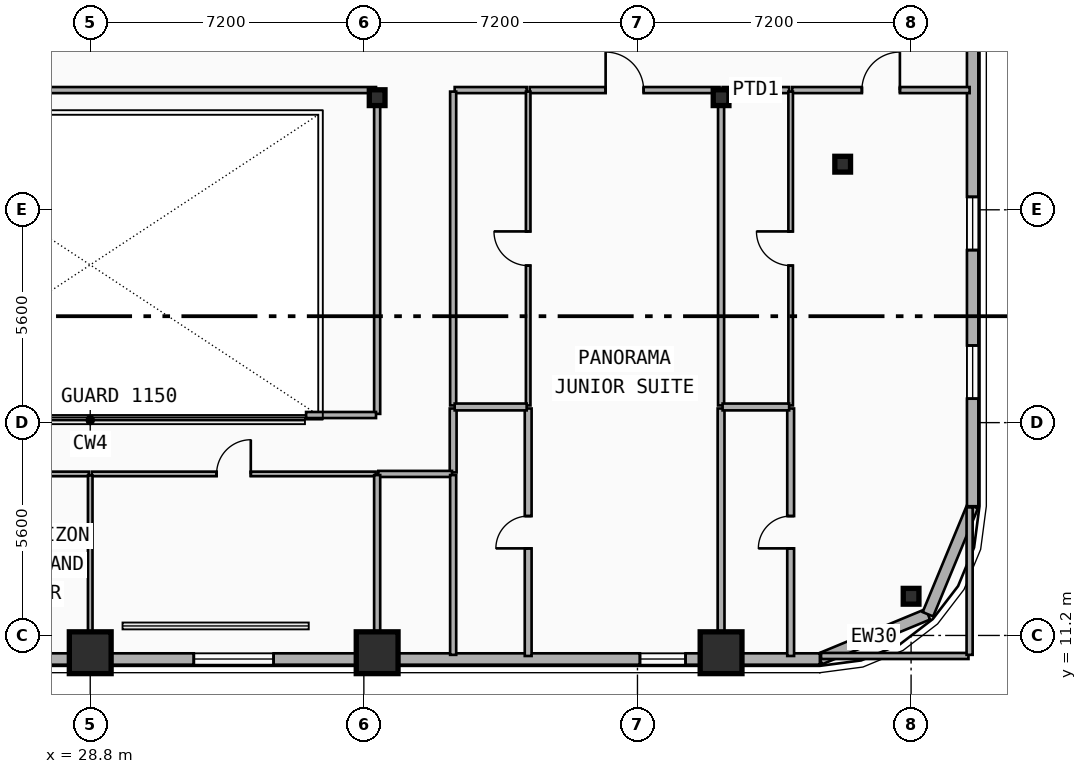
"""IFC4 building model, lengths in metres.
Left out: names, types, materials, properties, quantities, classifications, styles, units other than length and angle.
Written with IfcOpenShell. Run it as: python <this file> out.ifc"""

import sys

from ifc_helpers import new_model, si_unit, direction, frame, frame_2d, origin, origin_2d, place, context, subcontext, project, spatial, rectangle, i_section, extrude, element, fill, save


model = new_model("IFC4")
c1 = context("Model", 3, precision=1e-05, world=origin(), true_north=direction((0.0, 1.0)))
c2 = subcontext(c1, "Body", "Model", "MODEL_VIEW")
j1 = project(units=[si_unit("LENGTHUNIT", "METRE"), si_unit("PLANEANGLEUNIT", "RADIAN")], contexts=[c1])
p1 = place(None, origin())
s1 = spatial("IfcSite", under=j1, at=p1, CompositionType="ELEMENT")
p2 = place(p1, origin())
s2 = spatial("IfcBuilding", under=s1, at=p2, CompositionType="ELEMENT")
p3 = place(p2, frame((0.0, 0.0, 169.65)))
s3 = spatial("IfcBuildingStorey", under=s2, at=p3, CompositionType="ELEMENT", Elevation=169.65)
for number, where, z_axis, x_axis in (
    (1, (36.35, 25.35, 0.0), (0.0, 0.0, 1.0), (1.0, 0.0, 0.0)),
    (2, (45.4, 25.35, 0.0), (0.0, 0.0, 1.0), (1.0, 0.0, 0.0)),
):
    element("IfcColumn", number, at=place(p3, frame(where, z_axis=z_axis, x_axis=x_axis)), inside=s3, PredefinedType="COLUMN", context=c2, shape_type="SweptSolid", body=[
        extrude(i_section(OverallWidth=0.413, OverallDepth=0.415, WebThickness=0.03, FlangeThickness=0.047, FilletRadius=0.015, at=origin_2d()), origin(), (0.0, 0.0, 1.0), 3.55),
    ])
for number, where, z_axis, x_axis in (
    (3, (28.8, 10.854, 0.0), (0.0, -0.09, 0.996), (1.0, 0.0, 0.0)),
    (4, (36.35, 10.854, 0.0), (0.0, -0.09, 0.996), (1.0, 0.0, 0.0)),
    (5, (45.4, 10.854, 0.0), (0.0, -0.09, 0.996), (1.0, 0.0, 0.0)),
):
    element("IfcColumn", number, at=place(p3, frame(where, z_axis=z_axis, x_axis=x_axis)), inside=s3, PredefinedType="COLUMN", context=c2, shape_type="SweptSolid", body=[
        extrude(rectangle(XDim=1.1, YDim=1.1, at=origin_2d()), origin(), (0.0, 0.0, 1.0), 3.565),
    ])
p4 = place(p3, frame((48.6, 23.6, 0.0), z_axis=(0.0, 0.0, 1.0), x_axis=(1.0, 0.0, 0.0)))
e6 = element("IfcColumn", 6, at=p4, inside=s3, PredefinedType="COLUMN", context=c2, shape_type="SweptSolid", body=[
    extrude(i_section(OverallWidth=0.413, OverallDepth=0.415, WebThickness=0.03, FlangeThickness=0.047, FilletRadius=0.015, at=origin_2d()), origin(), (0.0, 0.0, 1.0), 3.55),
])
p5 = place(p3, frame((50.4, 12.327, 0.0), z_axis=(0.0, -0.079862380324, 0.996805898964), x_axis=(1.0, 0.0, 0.0)))
e7 = element("IfcColumn", 7, at=p5, inside=s3, PredefinedType="COLUMN", context=c2, shape_type="SweptSolid", body=[
    extrude(i_section(OverallWidth=0.413, OverallDepth=0.415, WebThickness=0.03, FlangeThickness=0.047, FilletRadius=0.015, at=origin_2d()), origin(), (0.0, 0.0, 1.0), 3.562),
])
p6 = place(p3, frame((50.843, 11.757, 0.0), z_axis=(0.0, 0.0, 1.0), x_axis=(-0.92389884758, -0.382636798336, 0.0)))
e8 = element("IfcWall", 8, at=p6, inside=s3, PredefinedType="SOLIDWALL", context=c2, shape_type="SweptSolid", body=[
    extrude(rectangle(XDim=3.077, YDim=0.3, at=frame_2d((1.538, 0.0))), origin(), (0.0, 0.0, 1.0), 3.29),
])
p7 = place(p3, frame((52.02, 14.6, 0.0), z_axis=(0.0, 0.0, 1.0), x_axis=(-0.382676475685, -0.923882414032, 0.0)))
e9 = element("IfcWall", 9, at=p7, inside=s3, PredefinedType="SOLIDWALL", context=c2, shape_type="SweptSolid", body=[
    extrude(rectangle(XDim=3.077, YDim=0.3, at=frame_2d((1.539, 0.0))), origin(), (0.0, 0.0, 1.0), 3.29),
])
p8 = place(p3, frame((52.02, 37.6, 0.0), z_axis=(0.0, 0.0, 1.0), x_axis=(0.0, -1.0, 0.0)))
e10 = element("IfcWall", 10, at=p8, inside=s3, PredefinedType="SOLIDWALL", context=c2, shape_type="SweptSolid", body=[
    extrude(rectangle(XDim=23.0, YDim=0.3, at=frame_2d((11.5, 0.0))), origin(), (0.0, 0.0, 1.0), 3.29),
])
p9 = place(p8, frame((2.513, 0.0, 0.34)))
e11 = element("IfcOpeningElement", 11, at=p9, cuts=e10, PredefinedType="OPENING", context=c2, shape_type="SweptSolid", body=[
    extrude(rectangle(XDim=1.4, YDim=2.1, at=frame_2d((0.7, 1.05))), frame((0.0, 0.16, 0.0), z_axis=(0.0, -1.0, 0.0), x_axis=(1.0, 0.0, 0.0)), (0.0, 0.0, 1.0), 0.32),
])
p10 = place(p8, frame((6.107, 0.0, 0.34)))
e12 = element("IfcOpeningElement", 12, at=p10, cuts=e10, PredefinedType="OPENING", context=c2, shape_type="SweptSolid", body=[
    extrude(rectangle(XDim=1.4, YDim=2.1, at=frame_2d((0.7, 1.05))), frame((0.0, 0.16, 0.0), z_axis=(0.0, -1.0, 0.0), x_axis=(1.0, 0.0, 0.0)), (0.0, 0.0, 1.0), 0.32),
])
p11 = place(p8, frame((14.86, 0.0, 0.34)))
e13 = element("IfcOpeningElement", 13, at=p11, cuts=e10, PredefinedType="OPENING", context=c2, shape_type="SweptSolid", body=[
    extrude(rectangle(XDim=1.4, YDim=2.1, at=frame_2d((0.7, 1.05))), frame((0.0, 0.16, 0.0), z_axis=(0.0, -1.0, 0.0), x_axis=(1.0, 0.0, 0.0)), (0.0, 0.0, 1.0), 0.32),
])
p12 = place(p8, frame((18.77, 0.0, 0.34)))
e14 = element("IfcOpeningElement", 14, at=p12, cuts=e10, PredefinedType="OPENING", context=c2, shape_type="SweptSolid", body=[
    extrude(rectangle(XDim=1.4, YDim=2.1, at=frame_2d((0.7, 1.05))), frame((0.0, 0.16, 0.0), z_axis=(0.0, -1.0, 0.0), x_axis=(1.0, 0.0, 0.0)), (0.0, 0.0, 1.0), 0.32),
])
p13 = place(p3, frame((48.0, 10.58, 0.0), z_axis=(0.0, 0.0, 1.0), x_axis=(-1.0, 0.0, 0.0)))
e15 = element("IfcWall", 15, at=p13, inside=s3, PredefinedType="SOLIDWALL", context=c2, shape_type="SweptSolid", body=[
    extrude(rectangle(XDim=38.4, YDim=0.3, at=frame_2d((19.2, 0.0))), origin(), (0.0, 0.0, 1.0), 2.91),
])
p14 = place(p13, frame((33.665, 0.0, 1.22)))
e16 = element("IfcOpeningElement", 16, at=p14, cuts=e15, PredefinedType="OPENING", context=c2, shape_type="SweptSolid", body=[
    extrude(rectangle(XDim=1.2, YDim=1.5, at=frame_2d((0.6, 0.75))), frame((0.0, 0.16, 0.0), z_axis=(0.0, -1.0, 0.0), x_axis=(1.0, 0.0, 0.0)), (0.0, 0.0, 1.0), 0.32),
])
p15 = place(p13, frame((21.468, 0.0, 0.63)))
e17 = element("IfcOpeningElement", 17, at=p15, cuts=e15, PredefinedType="OPENING", context=c2, shape_type="SweptSolid", body=[
    extrude(rectangle(XDim=2.1, YDim=2.1, at=frame_2d((1.05, 1.05))), frame((0.0, 0.16, 0.0), z_axis=(0.0, -1.0, 0.0), x_axis=(1.0, 0.0, 0.0)), (0.0, 0.0, 1.0), 0.32),
])
p16 = place(p13, frame((14.375, 0.0, 0.63)))
e18 = element("IfcOpeningElement", 18, at=p16, cuts=e15, PredefinedType="OPENING", context=c2, shape_type="SweptSolid", body=[
    extrude(rectangle(XDim=2.1, YDim=2.1, at=frame_2d((1.05, 1.05))), frame((0.0, 0.16, 0.0), z_axis=(0.0, -1.0, 0.0), x_axis=(1.0, 0.0, 0.0)), (0.0, 0.0, 1.0), 0.32),
])
p17 = place(p13, frame((3.535, 0.0, 0.65)))
e19 = element("IfcOpeningElement", 19, at=p17, cuts=e15, PredefinedType="OPENING", context=c2, shape_type="SweptSolid", body=[
    extrude(rectangle(XDim=1.2, YDim=1.5, at=frame_2d((0.6, 0.75))), frame((0.0, 0.16, 0.0), z_axis=(0.0, -1.0, 0.0), x_axis=(1.0, 0.0, 0.0)), (0.0, 0.0, 1.0), 0.32),
])
p18 = place(p13, frame((27.42, 0.0, 0.75)))
e20 = element("IfcOpeningElement", 20, at=p18, cuts=e15, PredefinedType="OPENING", context=c2, shape_type="SweptSolid", body=[
    extrude(rectangle(XDim=1.2, YDim=1.5, at=frame_2d((0.6, 0.75))), frame((0.0, 0.16, 0.0), z_axis=(0.0, -1.0, 0.0), x_axis=(1.0, 0.0, 0.0)), (0.0, 0.0, 1.0), 0.32),
])
p19 = place(p3, frame((40.364, 25.55, 0.0), z_axis=(0.0, 0.0, 1.0), x_axis=(1.0, 0.0, 0.0)))
e21 = element("IfcWall", 21, at=p19, inside=s3, PredefinedType="PARTITIONING", context=c2, shape_type="SweptSolid", body=[
    extrude(rectangle(XDim=4.996, YDim=0.16, at=frame_2d((2.498, 0.0))), origin(), (0.0, 0.0, 1.0), 2.36),
])
p20 = place(p19, frame((1.998, 0.0, 0.0)))
e22 = element("IfcOpeningElement", 22, at=p20, cuts=e21, PredefinedType="OPENING", context=c2, shape_type="SweptSolid", body=[
    extrude(rectangle(XDim=1.0, YDim=2.15, at=frame_2d((0.5, 1.075))), frame((0.0, 0.09, 0.0), z_axis=(0.0, -1.0, 0.0), x_axis=(1.0, 0.0, 0.0)), (0.0, 0.0, 1.0), 0.18),
])
p21 = place(p3, frame((38.39, 25.55, 0.0), z_axis=(0.0, 0.0, 1.0), x_axis=(1.0, 0.0, 0.0)))
e23 = element("IfcWall", 23, at=p21, inside=s3, PredefinedType="PARTITIONING", context=c2, shape_type="SweptSolid", body=[
    extrude(rectangle(XDim=1.894, YDim=0.16, at=frame_2d((0.947, 0.0))), origin(), (0.0, 0.0, 1.0), 3.29),
])
p22 = place(p3, frame((47.271, 25.55, 0.0), z_axis=(0.0, 0.0, 1.0), x_axis=(1.0, 0.0, 0.0)))
e24 = element("IfcWall", 24, at=p22, inside=s3, PredefinedType="PARTITIONING", context=c2, shape_type="SweptSolid", body=[
    extrude(rectangle(XDim=4.669, YDim=0.16, at=frame_2d((2.334, 0.0))), origin(), (0.0, 0.0, 1.0), 2.62),
])
p23 = place(p22, frame((1.834, 0.0, 0.0)))
e25 = element("IfcOpeningElement", 25, at=p23, cuts=e24, PredefinedType="OPENING", context=c2, shape_type="SweptSolid", body=[
    extrude(rectangle(XDim=1.0, YDim=2.15, at=frame_2d((0.5, 1.075))), frame((0.0, 0.09, 0.0), z_axis=(0.0, -1.0, 0.0), x_axis=(1.0, 0.0, 0.0)), (0.0, 0.0, 1.0), 0.18),
])
p24 = place(p3, frame((45.44, 25.55, 0.0), z_axis=(0.0, 0.0, 1.0), x_axis=(1.0, 0.0, 0.0)))
e26 = element("IfcWall", 26, at=p24, inside=s3, PredefinedType="PARTITIONING", context=c2, shape_type="SweptSolid", body=[
    extrude(rectangle(XDim=1.751, YDim=0.16, at=frame_2d((0.875, 0.0))), origin(), (0.0, 0.0, 1.0), 2.36),
])
p25 = place(p3, frame((38.35, 15.49, 0.0), z_axis=(0.0, 0.0, 1.0), x_axis=(0.0, 1.0, 0.0)))
e27 = element("IfcWall", 27, at=p25, inside=s3, PredefinedType="PLUMBINGWALL", context=c2, shape_type="SweptSolid", body=[
    extrude(rectangle(XDim=1.682, YDim=0.18, at=frame_2d((0.841, 0.0))), origin(), (0.0, 0.0, 1.0), 3.29),
])
p26 = place(p3, frame((38.35, 17.252, 0.0), z_axis=(0.0, 0.0, 1.0), x_axis=(0.0, 1.0, 0.0)))
e28 = element("IfcWall", 28, at=p26, inside=s3, PredefinedType="PARTITIONING", context=c2, shape_type="SweptSolid", body=[
    extrude(rectangle(XDim=8.258, YDim=0.16, at=frame_2d((4.129, 0.0))), origin(), (0.0, 0.0, 1.0), 2.83),
])
p27 = place(p3, frame((22.84, 15.45, 0.0), z_axis=(0.0, 0.0, 1.0), x_axis=(1.0, 0.0, 0.0)))
e29 = element("IfcWall", 29, at=p27, inside=s3, PredefinedType="PARTITIONING", context=c2, shape_type="SweptSolid", body=[
    extrude(rectangle(XDim=5.92, YDim=0.12, at=frame_2d((2.96, 0.0))), origin(), (0.0, 0.0, 1.0), 2.36),
])
p28 = place(p27, frame((2.51, 0.0, 0.0)))
e30 = element("IfcOpeningElement", 30, at=p28, cuts=e29, PredefinedType="OPENING", context=c2, shape_type="SweptSolid", body=[
    extrude(rectangle(XDim=0.9, YDim=2.1, at=frame_2d((0.45, 1.05))), frame((0.0, 0.07, 0.0), z_axis=(0.0, -1.0, 0.0), x_axis=(1.0, 0.0, 0.0)), (0.0, 0.0, 1.0), 0.14),
])
p29 = place(p3, frame((28.84, 15.45, 0.0), z_axis=(0.0, 0.0, 1.0), x_axis=(1.0, 0.0, 0.0)))
e31 = element("IfcWall", 31, at=p29, inside=s3, PredefinedType="PARTITIONING", context=c2, shape_type="SweptSolid", body=[
    extrude(rectangle(XDim=7.47, YDim=0.12, at=frame_2d((3.735, 0.0))), origin(), (0.0, 0.0, 1.0), 2.36),
])
p30 = place(p29, frame((3.285, 0.0, 0.0)))
e32 = element("IfcOpeningElement", 32, at=p30, cuts=e31, PredefinedType="OPENING", context=c2, shape_type="SweptSolid", body=[
    extrude(rectangle(XDim=0.9, YDim=2.1, at=frame_2d((0.45, 1.05))), frame((0.0, 0.07, 0.0), z_axis=(0.0, -1.0, 0.0), x_axis=(1.0, 0.0, 0.0)), (0.0, 0.0, 1.0), 0.14),
])
p31 = place(p3, frame((28.8, 10.66, 0.0), z_axis=(0.0, 0.0, 1.0), x_axis=(0.0, 1.0, 0.0)))
e33 = element("IfcWall", 33, at=p31, inside=s3, PredefinedType="PARTITIONING", context=c2, shape_type="SweptSolid", body=[
    extrude(rectangle(XDim=4.75, YDim=0.12, at=frame_2d((2.375, 0.0))), origin(), (0.0, 0.0, 1.0), 2.36),
])
p32 = place(p3, frame((40.324, 10.66, 0.0), z_axis=(0.0, 0.0, 1.0), x_axis=(0.0, 1.0, 0.0)))
e34 = element("IfcWall", 34, at=p32, inside=s3, PredefinedType="PLUMBINGWALL", context=c2, shape_type="SweptSolid", body=[
    extrude(rectangle(XDim=6.512, YDim=0.18, at=frame_2d((3.256, 0.0))), origin(), (0.0, 0.0, 1.0), 2.83),
])
p33 = place(p32, frame((2.831, 0.0, 0.0)))
e35 = element("IfcOpeningElement", 35, at=p33, cuts=e34, PredefinedType="OPENING", context=c2, shape_type="SweptSolid", body=[
    extrude(rectangle(XDim=0.85, YDim=2.1, at=frame_2d((0.425, 1.05))), frame((0.0, 0.1, 0.0), z_axis=(0.0, -1.0, 0.0), x_axis=(1.0, 0.0, 0.0)), (0.0, 0.0, 1.0), 0.2),
])
p34 = place(p3, frame((40.324, 17.252, 0.0), z_axis=(0.0, 0.0, 1.0), x_axis=(0.0, 1.0, 0.0)))
e36 = element("IfcWall", 36, at=p34, inside=s3, PredefinedType="PARTITIONING", context=c2, shape_type="SweptSolid", body=[
    extrude(rectangle(XDim=8.258, YDim=0.12, at=frame_2d((4.129, 0.0))), origin(), (0.0, 0.0, 1.0), 2.83),
])
p35 = place(p34, frame((3.679, 0.0, 0.0)))
e37 = element("IfcOpeningElement", 37, at=p35, cuts=e36, PredefinedType="OPENING", context=c2, shape_type="SweptSolid", body=[
    extrude(rectangle(XDim=0.9, YDim=2.1, at=frame_2d((0.45, 1.05))), frame((0.0, 0.07, 0.0), z_axis=(0.0, -1.0, 0.0), x_axis=(1.0, 0.0, 0.0)), (0.0, 0.0, 1.0), 0.14),
])
p36 = place(p3, frame((45.4, 10.66, 0.0), z_axis=(0.0, 0.0, 1.0), x_axis=(0.0, 1.0, 0.0)))
e38 = element("IfcWall", 38, at=p36, inside=s3, PredefinedType="PLUMBINGWALL", context=c2, shape_type="SweptSolid", body=[
    extrude(rectangle(XDim=6.512, YDim=0.18, at=frame_2d((3.256, 0.0))), origin(), (0.0, 0.0, 1.0), 2.36),
])
p37 = place(p3, frame((45.4, 17.252, 0.0), z_axis=(0.0, 0.0, 1.0), x_axis=(0.0, 1.0, 0.0)))
e39 = element("IfcWall", 39, at=p37, inside=s3, PredefinedType="PARTITIONING", context=c2, shape_type="SweptSolid", body=[
    extrude(rectangle(XDim=8.258, YDim=0.16, at=frame_2d((4.129, 0.0))), origin(), (0.0, 0.0, 1.0), 2.36),
])
p38 = place(p3, frame((38.39, 17.212, 0.0), z_axis=(0.0, 0.0, 1.0), x_axis=(1.0, 0.0, 0.0)))
e40 = element("IfcWall", 40, at=p38, inside=s3, PredefinedType="PLUMBINGWALL", context=c2, shape_type="SweptSolid", body=[
    extrude(rectangle(XDim=1.894, YDim=0.18, at=frame_2d((0.947, 0.0))), origin(), (0.0, 0.0, 1.0), 3.29),
])
p39 = place(p3, frame((47.231, 10.66, 0.0), z_axis=(0.0, 0.0, 1.0), x_axis=(0.0, 1.0, 0.0)))
e41 = element("IfcWall", 41, at=p39, inside=s3, PredefinedType="PLUMBINGWALL", context=c2, shape_type="SweptSolid", body=[
    extrude(rectangle(XDim=6.512, YDim=0.18, at=frame_2d((3.256, 0.0))), origin(), (0.0, 0.0, 1.0), 2.91),
])
p40 = place(p39, frame((2.831, 0.0, 0.0)))
e42 = element("IfcOpeningElement", 42, at=p40, cuts=e41, PredefinedType="OPENING", context=c2, shape_type="SweptSolid", body=[
    extrude(rectangle(XDim=0.85, YDim=2.1, at=frame_2d((0.425, 1.05))), frame((0.0, 0.1, 0.0), z_axis=(0.0, -1.0, 0.0), x_axis=(1.0, 0.0, 0.0)), (0.0, 0.0, 1.0), 0.2),
])
p41 = place(p3, frame((47.231, 17.252, 0.0), z_axis=(0.0, 0.0, 1.0), x_axis=(0.0, 1.0, 0.0)))
e43 = element("IfcWall", 43, at=p41, inside=s3, PredefinedType="PARTITIONING", context=c2, shape_type="SweptSolid", body=[
    extrude(rectangle(XDim=8.258, YDim=0.12, at=frame_2d((4.129, 0.0))), origin(), (0.0, 0.0, 1.0), 2.77),
])
p42 = place(p41, frame((3.679, 0.0, 0.0)))
e44 = element("IfcOpeningElement", 44, at=p42, cuts=e43, PredefinedType="OPENING", context=c2, shape_type="SweptSolid", body=[
    extrude(rectangle(XDim=0.9, YDim=2.1, at=frame_2d((0.45, 1.05))), frame((0.0, 0.07, 0.0), z_axis=(0.0, -1.0, 0.0), x_axis=(1.0, 0.0, 0.0)), (0.0, 0.0, 1.0), 0.14),
])
p43 = place(p3, frame((45.44, 17.212, 0.0), z_axis=(0.0, 0.0, 1.0), x_axis=(1.0, 0.0, 0.0)))
e45 = element("IfcWall", 45, at=p43, inside=s3, PredefinedType="PLUMBINGWALL", context=c2, shape_type="SweptSolid", body=[
    extrude(rectangle(XDim=1.751, YDim=0.18, at=frame_2d((0.875, 0.0))), origin(), (0.0, 0.0, 1.0), 2.36),
])
p44 = place(p3, frame((22.83, 25.55, 0.0), z_axis=(0.0, 0.0, 1.0), x_axis=(1.0, 0.0, 0.0)))
e46 = element("IfcWall", 46, at=p44, inside=s3, PredefinedType="PARTITIONING", context=c2, shape_type="SweptSolid", body=[
    extrude(rectangle(XDim=13.49, YDim=0.16, at=frame_2d((6.745, 0.0))), origin(), (0.0, 0.0, 1.0), 2.36),
])
p45 = place(p3, frame((36.38, 15.45, 0.0), z_axis=(0.0, 0.0, 1.0), x_axis=(1.0, 0.0, 0.0)))
e47 = element("IfcWall", 47, at=p45, inside=s3, PredefinedType="PARTITIONING", context=c2, shape_type="SweptSolid", body=[
    extrude(rectangle(XDim=1.94, YDim=0.16, at=frame_2d((0.97, 0.0))), origin(), (0.0, 0.0, 1.0), 2.36),
])
p46 = place(p3, frame((36.35, 17.03, 0.0), z_axis=(0.0, 0.0, 1.0), x_axis=(0.0, 1.0, 0.0)))
e48 = element("IfcWall", 48, at=p46, inside=s3, PredefinedType="PARTITIONING", context=c2, shape_type="SweptSolid", body=[
    extrude(rectangle(XDim=8.49, YDim=0.16, at=frame_2d((4.245, 0.0))), origin(), (0.0, 0.0, 1.0), 2.36),
])
p47 = place(p3, frame((34.48, 17.0, 0.0), z_axis=(0.0, 0.0, 1.0), x_axis=(1.0, 0.0, 0.0)))
e49 = element("IfcWall", 49, at=p47, inside=s3, PredefinedType="PARTITIONING", context=c2, shape_type="SweptSolid", body=[
    extrude(rectangle(XDim=1.84, YDim=0.16, at=frame_2d((0.92, 0.0))), origin(), (0.0, 0.0, 1.0), 2.36),
])
p48 = place(p3, frame((36.35, 10.69, 0.0), z_axis=(0.0, 0.0, 1.0), x_axis=(0.0, 1.0, 0.0)))
e50 = element("IfcWall", 50, at=p48, inside=s3, PredefinedType="PARTITIONING", context=c2, shape_type="SweptSolid", body=[
    extrude(rectangle(XDim=4.73, YDim=0.16, at=frame_2d((2.365, 0.0))), origin(), (0.0, 0.0, 1.0), 2.36),
])
p49 = place(p3, frame((38.35, 10.69, 0.0), z_axis=(0.0, 0.0, 1.0), x_axis=(0.0, 1.0, 0.0)))
e51 = element("IfcWall", 51, at=p49, inside=s3, PredefinedType="PARTITIONING", context=c2, shape_type="SweptSolid", body=[
    extrude(rectangle(XDim=4.73, YDim=0.16, at=frame_2d((2.365, 0.0))), origin(), (0.0, 0.0, 1.0), 2.83),
])
p50 = place(p3, frame((48.03, 10.66, 0.0), z_axis=(0.0, 0.0, 1.0), x_axis=(1.0, 0.0, 0.0)))
e52 = element("IfcWall", 52, at=p50, inside=s3, PredefinedType="PARTITIONING", context=c2, shape_type="SweptSolid", body=[
    extrude(rectangle(XDim=3.88, YDim=0.16, at=frame_2d((1.94, 0.0))), origin(), (0.0, 0.0, 1.0), 3.29),
])
p51 = place(p3, frame((51.94, 10.69, 0.0), z_axis=(0.0, 0.0, 1.0), x_axis=(0.0, 1.0, 0.0)))
e53 = element("IfcWall", 53, at=p51, inside=s3, PredefinedType="PARTITIONING", context=c2, shape_type="SweptSolid", body=[
    extrude(rectangle(XDim=3.88, YDim=0.16, at=frame_2d((1.94, 0.0))), origin(), (0.0, 0.0, 1.0), 3.29),
])
p52 = place(p11, origin())
e54 = element("IfcWindow", 54, at=p52, inside=s3, PartitioningType="SINGLE_PANEL", PredefinedType="WINDOW", context=c2, shape_type="SweptSolid", body=[
    extrude(rectangle(XDim=1.4, YDim=2.1, at=frame_2d((0.7, 1.05))), frame((0.0, 0.03, 0.0), z_axis=(0.0, -1.0, 0.0), x_axis=(1.0, 0.0, 0.0)), (0.0, 0.0, 1.0), 0.06),
])
fill(e13, e54)
p53 = place(p12, origin())
e55 = element("IfcWindow", 55, at=p53, inside=s3, PartitioningType="SINGLE_PANEL", PredefinedType="WINDOW", context=c2, shape_type="SweptSolid", body=[
    extrude(rectangle(XDim=1.4, YDim=2.1, at=frame_2d((0.7, 1.05))), frame((0.0, 0.03, 0.0), z_axis=(0.0, -1.0, 0.0), x_axis=(1.0, 0.0, 0.0)), (0.0, 0.0, 1.0), 0.06),
])
fill(e14, e55)
p54 = place(p16, origin())
e56 = element("IfcWindow", 56, at=p54, inside=s3, PartitioningType="SINGLE_PANEL", PredefinedType="WINDOW", context=c2, shape_type="SweptSolid", body=[
    extrude(rectangle(XDim=2.1, YDim=2.1, at=frame_2d((1.05, 1.05))), frame((0.0, 0.03, 0.0), z_axis=(0.0, -1.0, 0.0), x_axis=(1.0, 0.0, 0.0)), (0.0, 0.0, 1.0), 0.06),
])
fill(e18, e56)
p55 = place(p17, origin())
e57 = element("IfcWindow", 57, at=p55, inside=s3, PartitioningType="SINGLE_PANEL", PredefinedType="WINDOW", context=c2, shape_type="SweptSolid", body=[
    extrude(rectangle(XDim=1.2, YDim=1.5, at=frame_2d((0.6, 0.75))), frame((0.0, 0.03, 0.0), z_axis=(0.0, -1.0, 0.0), x_axis=(1.0, 0.0, 0.0)), (0.0, 0.0, 1.0), 0.06),
])
fill(e19, e57)
p56 = place(p20, origin())
e58 = element("IfcDoor", 58, at=p56, inside=s3, OperationType="SINGLE_SWING_LEFT", PredefinedType="DOOR", context=c2, shape_type="SweptSolid", body=[
    extrude(rectangle(XDim=1.0, YDim=2.15, at=frame_2d((0.5, 1.075))), frame((0.0, 0.025, 0.0), z_axis=(0.0, -1.0, 0.0), x_axis=(1.0, 0.0, 0.0)), (0.0, 0.0, 1.0), 0.05),
])
fill(e22, e58)
p57 = place(p23, origin())
e59 = element("IfcDoor", 59, at=p57, inside=s3, OperationType="SINGLE_SWING_RIGHT", PredefinedType="DOOR", context=c2, shape_type="SweptSolid", body=[
    extrude(rectangle(XDim=1.0, YDim=2.15, at=frame_2d((0.5, 1.075))), frame((0.0, 0.025, 0.0), z_axis=(0.0, -1.0, 0.0), x_axis=(1.0, 0.0, 0.0)), (0.0, 0.0, 1.0), 0.05),
])
fill(e25, e59)
p58 = place(p30, origin())
e60 = element("IfcDoor", 60, at=p58, inside=s3, OperationType="SINGLE_SWING_RIGHT", PredefinedType="DOOR", context=c2, shape_type="SweptSolid", body=[
    extrude(rectangle(XDim=0.9, YDim=2.1, at=frame_2d((0.45, 1.05))), frame((0.0, 0.025, 0.0), z_axis=(0.0, -1.0, 0.0), x_axis=(1.0, 0.0, 0.0)), (0.0, 0.0, 1.0), 0.05),
])
fill(e32, e60)
p59 = place(p33, origin())
e61 = element("IfcDoor", 61, at=p59, inside=s3, OperationType="SINGLE_SWING_LEFT", PredefinedType="DOOR", context=c2, shape_type="SweptSolid", body=[
    extrude(rectangle(XDim=0.85, YDim=2.1, at=frame_2d((0.425, 1.05))), frame((0.0, 0.025, 0.0), z_axis=(0.0, -1.0, 0.0), x_axis=(1.0, 0.0, 0.0)), (0.0, 0.0, 1.0), 0.05),
])
fill(e35, e61)
p60 = place(p35, origin())
e62 = element("IfcDoor", 62, at=p60, inside=s3, OperationType="SINGLE_SWING_RIGHT", PredefinedType="DOOR", context=c2, shape_type="SweptSolid", body=[
    extrude(rectangle(XDim=0.9, YDim=2.1, at=frame_2d((0.45, 1.05))), frame((0.0, 0.025, 0.0), z_axis=(0.0, -1.0, 0.0), x_axis=(1.0, 0.0, 0.0)), (0.0, 0.0, 1.0), 0.05),
])
fill(e37, e62)
p61 = place(p40, origin())
e63 = element("IfcDoor", 63, at=p61, inside=s3, OperationType="SINGLE_SWING_LEFT", PredefinedType="DOOR", context=c2, shape_type="SweptSolid", body=[
    extrude(rectangle(XDim=0.85, YDim=2.1, at=frame_2d((0.425, 1.05))), frame((0.0, 0.025, 0.0), z_axis=(0.0, -1.0, 0.0), x_axis=(1.0, 0.0, 0.0)), (0.0, 0.0, 1.0), 0.05),
])
fill(e42, e63)
p62 = place(p42, origin())
e64 = element("IfcDoor", 64, at=p62, inside=s3, OperationType="SINGLE_SWING_RIGHT", PredefinedType="DOOR", context=c2, shape_type="SweptSolid", body=[
    extrude(rectangle(XDim=0.9, YDim=2.1, at=frame_2d((0.45, 1.05))), frame((0.0, 0.025, 0.0), z_axis=(0.0, -1.0, 0.0), x_axis=(1.0, 0.0, 0.0)), (0.0, 0.0, 1.0), 0.05),
])
fill(e44, e64)
save(model, sys.argv[1])
